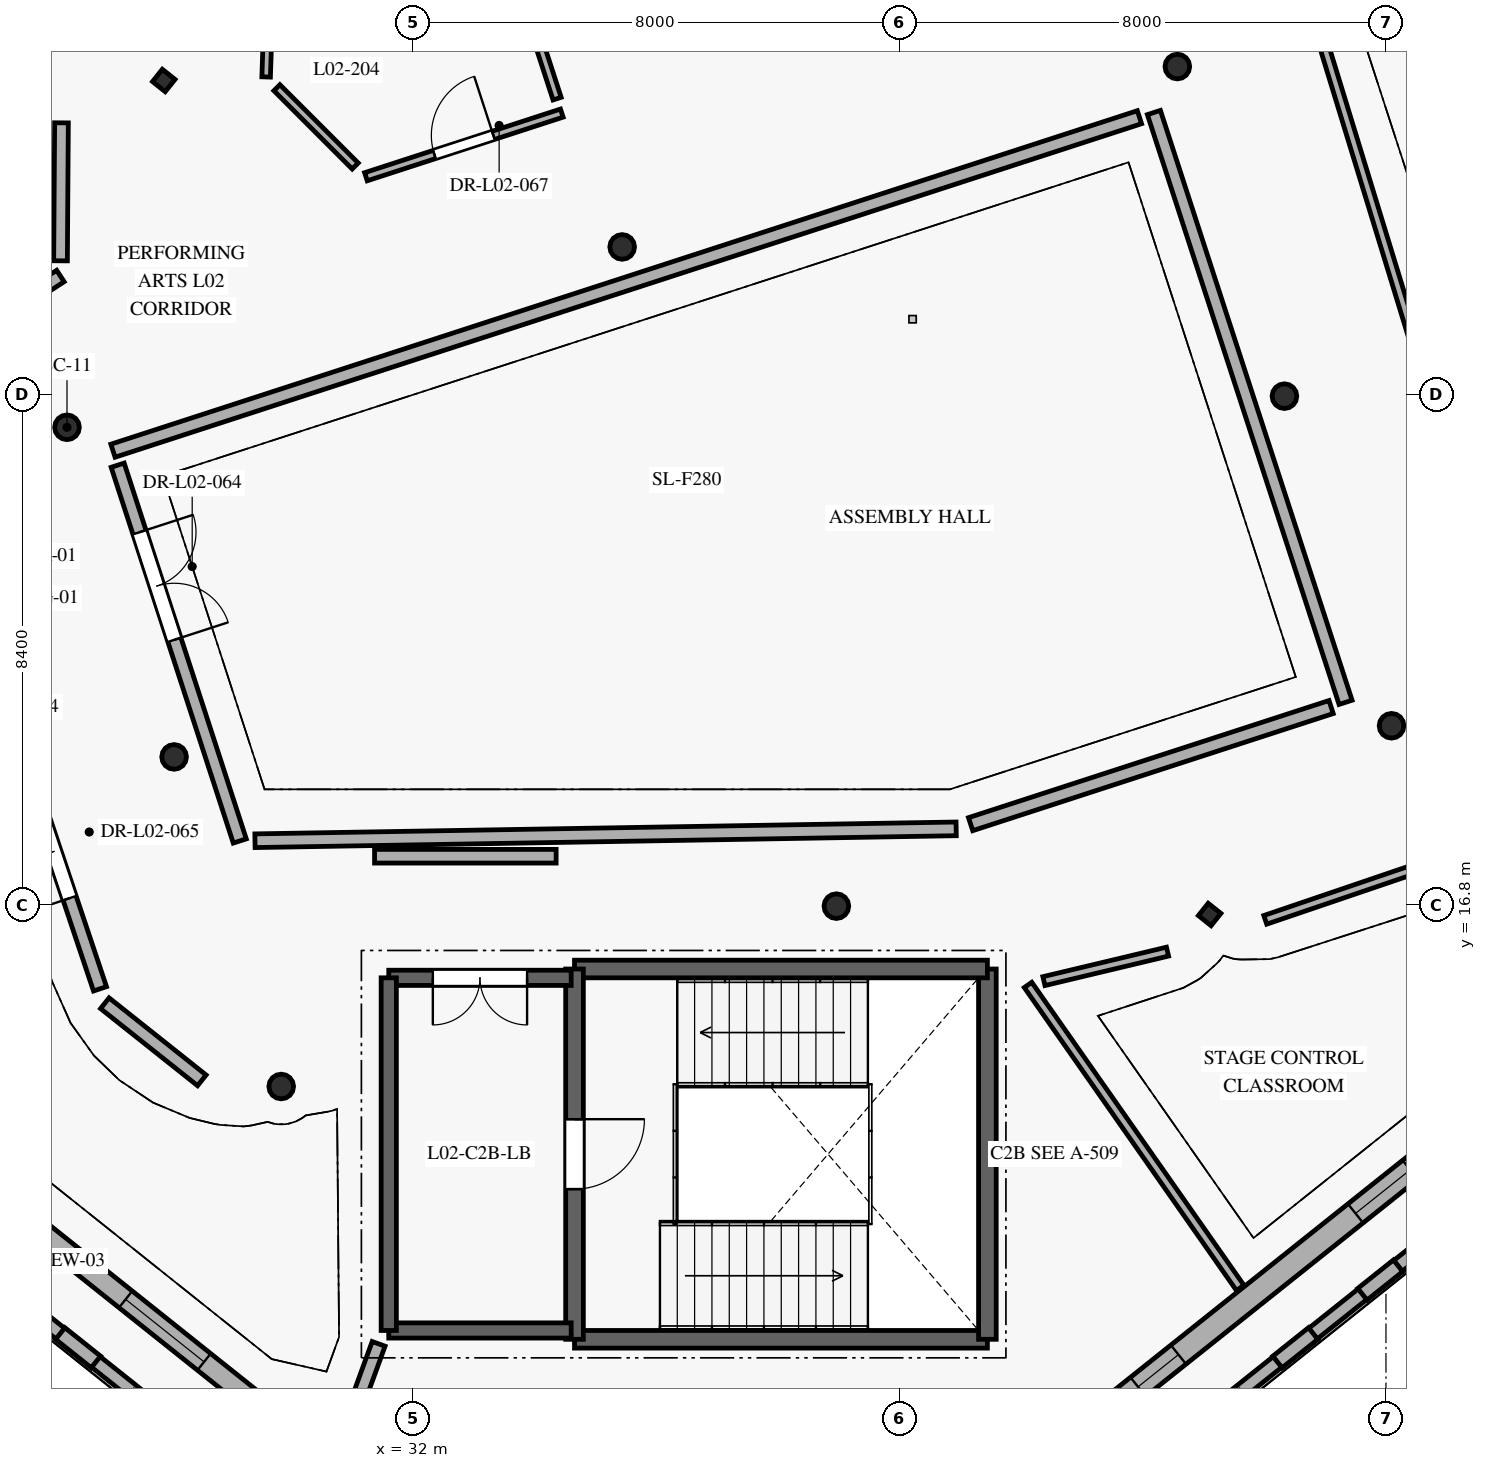
"""IFC4 building model, lengths in metres.
Left out: names, types, materials, properties, quantities, classifications, styles, units other than length and angle.
Written with IfcOpenShell. Run it as: python <this file> out.ifc"""

import sys

from ifc_helpers import new_model, si_unit, direction, frame, frame_2d, origin, origin_2d, place, context, subcontext, project, spatial, rectangle, hollow_circle, i_section, extrude, element, fill, save


model = new_model("IFC4")
c1 = context("Model", 3, precision=1e-05, world=origin(), true_north=direction((0.0, 1.0)))
c2 = subcontext(c1, "Body", "Model", "MODEL_VIEW")
j1 = project(units=[si_unit("LENGTHUNIT", "METRE"), si_unit("PLANEANGLEUNIT", "RADIAN")], contexts=[c1])
p1 = place(None, origin())
s1 = spatial("IfcSite", under=j1, at=p1, CompositionType="ELEMENT")
p2 = place(p1, origin())
s2 = spatial("IfcBuilding", under=s1, at=p2, CompositionType="ELEMENT")
p3 = place(p2, frame((0.0, 0.0, 8.4)))
s3 = spatial("IfcBuildingStorey", under=s2, at=p3, CompositionType="ELEMENT", Elevation=8.4)
for number, where, z_axis, x_axis in (
    (1, (29.831, 13.812, 0.0), (0.0, 0.0, 1.0), (0.951, 0.309, 0.0)),
    (2, (28.07, 19.233, 0.0), (0.0, 0.0, 1.0), (0.951, 0.309, 0.0)),
    (3, (26.309, 24.655, 0.0), (0.0, 0.0, 1.0), (0.951, 0.309, 0.0)),
    (4, (38.961, 16.779, 0.0), (0.0, 0.0, 1.0), (0.951, 0.309, 0.0)),
    (5, (35.439, 27.621, 0.0), (0.0, 0.0, 1.0), (0.951, 0.309, 0.0)),
    (6, (48.092, 19.746, 0.0), (0.0, 0.0, 1.0), (0.951, 0.309, 0.0)),
    (7, (46.33, 25.167, 0.0), (0.0, 0.0, 1.0), (0.951, 0.309, 0.0)),
    (8, (44.569, 30.588, 0.0), (0.0, 0.0, 1.0), (0.951, 0.309, 0.0)),
):
    element("IfcColumn", number, at=place(p3, frame(where, z_axis=z_axis, x_axis=x_axis)), inside=s3, PredefinedType="COLUMN", context=c2, shape_type="SweptSolid", body=[
        extrude(hollow_circle(Radius=0.203, WallThickness=0.016, at=origin_2d()), origin(), (0.0, 0.0, 1.0), 4.2),
    ])
for number, where, z_axis, x_axis in (
    (9, (27.9, 30.358, 0.0), (0.0, 0.0, 1.0), (-0.623, -0.782, 0.0)),
    (10, (45.1, 16.642, 0.0), (0.0, 0.0, 1.0), (0.623, 0.782, 0.0)),
):
    element("IfcColumn", number, at=place(p3, frame(where, z_axis=z_axis, x_axis=x_axis)), inside=s3, PredefinedType="COLUMN", context=c2, shape_type="SweptSolid", body=[
        extrude(i_section(OverallWidth=0.259, OverallDepth=0.267, WebThickness=0.013, FlangeThickness=0.021, FilletRadius=0.013, at=origin_2d()), origin(), (0.0, 0.0, 1.0), 4.2),
    ])
p4 = place(p3, frame((29.351, 8.655, 0.0), z_axis=(0.0, 0.0, 1.0), x_axis=(-0.781819636461, 0.623504655992, 0.0)))
e11 = element("IfcWall", 11, at=p4, inside=s3, PredefinedType="SOLIDWALL", context=c2, shape_type="SweptSolid", body=[
    extrude(rectangle(XDim=7.333, YDim=0.35, at=frame_2d((3.667, 0.0))), origin(), (0.0, 0.0, 1.0), 3.94),
])
p5 = place(p4, frame((1.008, 0.0, 0.85)))
e12 = element("IfcOpeningElement", 12, at=p5, cuts=e11, PredefinedType="OPENING", context=c2, shape_type="SweptSolid", body=[
    extrude(rectangle(XDim=1.65, YDim=1.6, at=frame_2d((0.825, 0.8))), frame((0.0, 0.185, 0.0), z_axis=(0.0, -1.0, 0.0), x_axis=(1.0, 0.0, 0.0)), (0.0, 0.0, 1.0), 0.37),
])
p6 = place(p4, frame((4.6, 0.0, 0.85)))
e13 = element("IfcOpeningElement", 13, at=p6, cuts=e11, PredefinedType="OPENING", context=c2, shape_type="SweptSolid", body=[
    extrude(rectangle(XDim=1.8, YDim=1.6, at=frame_2d((0.9, 0.8))), frame((0.0, 0.185, 0.0), z_axis=(0.0, -1.0, 0.0), x_axis=(1.0, 0.0, 0.0)), (0.0, 0.0, 1.0), 0.37),
])
p7 = place(p3, frame((49.382, 13.227, 0.0), z_axis=(0.0, 0.0, 1.0), x_axis=(-0.781819636461, -0.623504655992, 0.0)))
e14 = element("IfcWall", 14, at=p7, inside=s3, PredefinedType="SOLIDWALL", context=c2, shape_type="SweptSolid", body=[
    extrude(rectangle(XDim=7.333, YDim=0.4, at=frame_2d((3.667, 0.0))), origin(), (0.0, 0.0, 1.0), 3.94),
])
p8 = place(p7, frame((1.258, 0.0, 0.85)))
e15 = element("IfcOpeningElement", 15, at=p8, cuts=e14, PredefinedType="OPENING", context=c2, shape_type="SweptSolid", body=[
    extrude(rectangle(XDim=1.15, YDim=1.8, at=frame_2d((0.575, 0.9))), frame((0.0, 0.21, 0.0), z_axis=(0.0, -1.0, 0.0), x_axis=(1.0, 0.0, 0.0)), (0.0, 0.0, 1.0), 0.42),
])
p9 = place(p7, frame((6.133, 0.0, 0.85)))
e16 = element("IfcOpeningElement", 16, at=p9, cuts=e14, PredefinedType="OPENING", context=c2, shape_type="SweptSolid", body=[
    extrude(rectangle(XDim=0.85, YDim=1.4, at=frame_2d((0.425, 0.7))), frame((0.0, 0.21, 0.0), z_axis=(0.0, -1.0, 0.0), x_axis=(1.0, 0.0, 0.0)), (0.0, 0.0, 1.0), 0.42),
])
p10 = place(p3, frame((22.998, 12.301, 0.0), z_axis=(0.0, 0.0, 1.0), x_axis=(0.781840989125, -0.623477880702, 0.0)))
e17 = element("IfcWall", 17, at=p10, inside=s3, PredefinedType="ELEMENTEDWALL", context=c2, shape_type="SweptSolid", body=[
    extrude(rectangle(XDim=7.147, YDim=0.225, at=frame_2d((3.573, 0.0))), origin(), (0.0, 0.0, 1.0), 1.09),
])
p11 = place(p3, frame((26.198, 9.75, 1.09), z_axis=(0.0, 0.0, 1.0), x_axis=(0.781789197913, -0.623542821326, 0.0)))
e18 = element("IfcWall", 18, at=p11, inside=s3, PredefinedType="ELEMENTEDWALL", context=c2, shape_type="SweptSolid", body=[
    extrude(rectangle(XDim=0.75, YDim=0.245, at=frame_2d((0.375, 0.0))), origin(), (0.0, 0.0, 1.0), 2.85),
])
p12 = place(p3, frame((44.413, 7.844, 0.0), z_axis=(0.0, 0.0, 1.0), x_axis=(0.781830872194, 0.623490567118, 0.0)))
e19 = element("IfcWall", 19, at=p12, inside=s3, PredefinedType="ELEMENTEDWALL", context=c2, shape_type="SweptSolid", body=[
    extrude(rectangle(XDim=7.148, YDim=0.225, at=frame_2d((3.574, 0.0))), origin(), (0.0, 0.0, 1.0), 1.09),
])
for number, where, z_axis, x_axis in (
    (20, (46.216, 9.282, 1.09), (0.0, 0.0, 1.0), (0.782, 0.624, 0.0)),
    (21, (47.613, 10.396, 1.09), (0.0, 0.0, 1.0), (0.782, 0.624, 0.0)),
):
    element("IfcWall", number, at=place(p3, frame(where, z_axis=z_axis, x_axis=x_axis)), inside=s3, PredefinedType="ELEMENTEDWALL", context=c2, shape_type="SweptSolid", body=[
        extrude(rectangle(XDim=0.751, YDim=0.245, at=frame_2d((0.375, 0.0))), origin(), (0.0, 0.0, 1.0), 2.85),
    ])
p13 = place(p3, frame((34.655, 9.655, 0.0), z_axis=(0.0, 0.0, 1.0), x_axis=(1.0, 0.0, 0.0)))
e22 = element("IfcWall", 22, at=p13, inside=s3, PredefinedType="SHEAR", context=c2, shape_type="SweptSolid", body=[
    extrude(rectangle(XDim=6.79, YDim=0.29, at=frame_2d((3.395, 0.0))), origin(), (0.0, 0.0, 1.0), 3.95),
])
p14 = place(p3, frame((41.445, 9.655, 0.0), z_axis=(0.0, 0.0, 1.0), x_axis=(0.0, 1.0, 0.0)))
e23 = element("IfcWall", 23, at=p14, inside=s3, PredefinedType="SHEAR", context=c2, shape_type="SweptSolid", body=[
    extrude(rectangle(XDim=6.09, YDim=0.29, at=frame_2d((3.045, 0.0))), origin(), (0.0, 0.0, 1.0), 3.95),
])
p15 = place(p3, frame((41.445, 15.745, 0.0), z_axis=(0.0, 0.0, 1.0), x_axis=(-1.0, 0.0, 0.0)))
e24 = element("IfcWall", 24, at=p15, inside=s3, PredefinedType="SHEAR", context=c2, shape_type="SweptSolid", body=[
    extrude(rectangle(XDim=6.79, YDim=0.29, at=frame_2d((3.395, 0.0))), origin(), (0.0, 0.0, 1.0), 3.95),
])
p16 = place(p3, frame((34.655, 15.745, 0.0), z_axis=(0.0, 0.0, 1.0), x_axis=(0.0, -1.0, 0.0)))
e25 = element("IfcWall", 25, at=p16, inside=s3, PredefinedType="SHEAR", context=c2, shape_type="SweptSolid", body=[
    extrude(rectangle(XDim=6.09, YDim=0.29, at=frame_2d((3.045, 0.0))), origin(), (0.0, 0.0, 1.0), 3.95),
])
p17 = place(p16, frame((2.47, 0.0, 0.0)))
e26 = element("IfcOpeningElement", 26, at=p17, cuts=e25, PredefinedType="OPENING", context=c2, shape_type="SweptSolid", body=[
    extrude(rectangle(XDim=1.15, YDim=2.1, at=frame_2d((0.575, 1.05))), frame((0.0, 0.155, 0.0), z_axis=(0.0, -1.0, 0.0), x_axis=(1.0, 0.0, 0.0)), (0.0, 0.0, 1.0), 0.31),
])
p18 = place(p3, frame((31.6, 9.8, 0.0), z_axis=(0.0, 0.0, 1.0), x_axis=(1.0, 0.0, 0.0)))
e27 = element("IfcWall", 27, at=p18, inside=s3, PredefinedType="SHEAR", context=c2, shape_type="SweptSolid", body=[
    extrude(rectangle(XDim=3.0, YDim=0.25, at=frame_2d((1.5, 0.0))), origin(), (0.0, 0.0, 1.0), 3.95),
])
p19 = place(p3, frame((34.6, 15.6, 0.0), z_axis=(0.0, 0.0, 1.0), x_axis=(-1.0, 0.0, 0.0)))
e28 = element("IfcWall", 28, at=p19, inside=s3, PredefinedType="SHEAR", context=c2, shape_type="SweptSolid", body=[
    extrude(rectangle(XDim=3.0, YDim=0.25, at=frame_2d((1.5, 0.0))), origin(), (0.0, 0.0, 1.0), 3.95),
])
p20 = place(p19, frame((0.725, 0.0, 0.0)))
e29 = element("IfcOpeningElement", 29, at=p20, cuts=e28, PredefinedType="OPENING", context=c2, shape_type="SweptSolid", body=[
    extrude(rectangle(XDim=1.55, YDim=2.15, at=frame_2d((0.775, 1.075))), frame((0.0, 0.135, 0.0), z_axis=(0.0, -1.0, 0.0), x_axis=(1.0, 0.0, 0.0)), (0.0, 0.0, 1.0), 0.27),
])
p21 = place(p3, frame((31.6, 15.6, 0.0), z_axis=(0.0, 0.0, 1.0), x_axis=(0.0, -1.0, 0.0)))
e30 = element("IfcWall", 30, at=p21, inside=s3, PredefinedType="SHEAR", context=c2, shape_type="SweptSolid", body=[
    extrude(rectangle(XDim=5.8, YDim=0.25, at=frame_2d((2.9, 0.0))), origin(), (0.0, 0.0, 1.0), 3.95),
])
p22 = place(p3, frame((47.335, 20.131, 0.0), z_axis=(0.0, 0.0, 1.0), x_axis=(-0.309009217467, 0.951059043131, 0.0)))
e31 = element("IfcWall", 31, at=p22, inside=s3, PredefinedType="PARTITIONING", context=c2, shape_type="SweptSolid", body=[
    extrude(rectangle(XDim=10.2, YDim=0.225, at=frame_2d((5.1, 0.0))), origin(), (0.0, 0.0, 1.0), 3.95),
])
p23 = place(p3, frame((43.946, 29.754, 0.0), z_axis=(0.0, 0.0, 1.0), x_axis=(-0.951056101214, -0.309018271859, 0.0)))
e32 = element("IfcWall", 32, at=p23, inside=s3, PredefinedType="PARTITIONING", context=c2, shape_type="SweptSolid", body=[
    extrude(rectangle(XDim=17.75, YDim=0.225, at=frame_2d((8.875, 0.0))), origin(), (0.0, 0.0, 1.0), 3.95),
])
p24 = place(p3, frame((27.142, 24.031, 0.0), z_axis=(0.0, 0.0, 1.0), x_axis=(0.308983288639, -0.951067467292, 0.0)))
e33 = element("IfcWall", 33, at=p24, inside=s3, PredefinedType="PARTITIONING", context=c2, shape_type="SweptSolid", body=[
    extrude(rectangle(XDim=6.499, YDim=0.225, at=frame_2d((3.25, 0.0))), origin(), (0.0, 0.0, 1.0), 3.95),
])
p25 = place(p24, frame((1.16, 0.0, 0.0)))
e34 = element("IfcOpeningElement", 34, at=p25, cuts=e33, PredefinedType="OPENING", context=c2, shape_type="SweptSolid", body=[
    extrude(rectangle(XDim=1.86, YDim=2.2, at=frame_2d((0.93, 1.1))), frame((0.0, 0.123, 0.0), z_axis=(0.0, -1.0, 0.0), x_axis=(1.0, 0.0, 0.0)), (0.0, 0.0, 1.0), 0.245),
])
p26 = place(p3, frame((29.4, 17.855, 0.0), z_axis=(0.0, 0.0, 1.0), x_axis=(0.999856594605, 0.016934881877, 0.0)))
e35 = element("IfcWall", 35, at=p26, inside=s3, PredefinedType="PARTITIONING", context=c2, shape_type="SweptSolid", body=[
    extrude(rectangle(XDim=11.533, YDim=0.225, at=frame_2d((5.767, 0.0))), origin(), (0.0, 0.0, 1.0), 3.95),
])
p27 = place(p3, frame((41.169, 18.127, 0.0), z_axis=(0.0, 0.0, 1.0), x_axis=(0.951056803868, 0.309016109316, 0.0)))
e36 = element("IfcWall", 36, at=p27, inside=s3, PredefinedType="PARTITIONING", context=c2, shape_type="SweptSolid", body=[
    extrude(rectangle(XDim=6.234, YDim=0.225, at=frame_2d((3.117, 0.0))), origin(), (0.0, 0.0, 1.0), 3.95),
])
p28 = place(p3, frame((31.028, 8.464, 0.0), z_axis=(0.0, 0.0, 1.0), x_axis=(0.341957686727, 0.939715350778, 0.0)))
e37 = element("IfcWall", 37, at=p28, inside=s3, PredefinedType="PARTITIONING", context=c2, shape_type="SweptSolid", body=[
    extrude(rectangle(XDim=1.187, YDim=0.225, at=frame_2d((0.594, 0.0))), origin(), (0.0, 0.0, 1.0), 3.93),
])
p29 = place(p3, frame((34.353, 17.6, 0.0), z_axis=(0.0, 0.0, 1.0), x_axis=(-1.0, 0.0, 0.0)))
e38 = element("IfcWall", 38, at=p29, inside=s3, PredefinedType="PARTITIONING", context=c2, shape_type="SweptSolid", body=[
    extrude(rectangle(XDim=2.986, YDim=0.225, at=frame_2d((1.493, 0.0))), origin(), (0.0, 0.0, 1.0), 3.93),
])
p30 = place(p3, frame((28.526, 13.914, 0.0), z_axis=(0.0, 0.0, 1.0), x_axis=(-0.782746940471, 0.622340121785, 0.0)))
e39 = element("IfcWall", 39, at=p30, inside=s3, PredefinedType="PARTITIONING", context=c2, shape_type="SweptSolid", body=[
    extrude(rectangle(XDim=2.038, YDim=0.225, at=frame_2d((1.019, 0.0))), origin(), (0.0, 0.0, 1.0), 3.93),
])
p31 = place(p3, frame((26.851, 15.419, 0.0), z_axis=(0.0, 0.0, 1.0), x_axis=(-0.31777961132, 0.94816460524, 0.0)))
e40 = element("IfcWall", 40, at=p31, inside=s3, PredefinedType="PARTITIONING", context=c2, shape_type="SweptSolid", body=[
    extrude(rectangle(XDim=4.766, YDim=0.225, at=frame_2d((2.383, 0.0))), origin(), (0.0, 0.0, 1.0), 3.93),
])
p32 = place(p31, frame((1.573, 0.0, 0.0)))
e41 = element("IfcOpeningElement", 41, at=p32, cuts=e40, PredefinedType="OPENING", context=c2, shape_type="SweptSolid", body=[
    extrude(rectangle(XDim=1.62, YDim=2.18, at=frame_2d((0.81, 1.09))), frame((0.0, 0.123, 0.0), z_axis=(0.0, -1.0, 0.0), x_axis=(1.0, 0.0, 0.0)), (0.0, 0.0, 1.0), 0.245),
])
p33 = place(p3, frame((24.799, 26.233, 0.0), z_axis=(0.0, 0.0, 1.0), x_axis=(0.838780833137, 0.54446920387, 0.0)))
e42 = element("IfcWall", 42, at=p33, inside=s3, PredefinedType="PARTITIONING", context=c2, shape_type="SweptSolid", body=[
    extrude(rectangle(XDim=1.67, YDim=0.225, at=frame_2d((0.835, 0.0))), origin(), (0.0, 0.0, 1.0), 3.93),
])
p34 = place(p3, frame((26.202, 27.393, 0.0), z_axis=(0.0, 0.0, 1.0), x_axis=(0.006993588379, 0.999975544562, 0.0)))
e43 = element("IfcWall", 43, at=p34, inside=s3, PredefinedType="PARTITIONING", context=c2, shape_type="SweptSolid", body=[
    extrude(rectangle(XDim=2.269, YDim=0.225, at=frame_2d((1.135, 0.0))), origin(), (0.0, 0.0, 1.0), 3.93),
])
p35 = place(p3, frame((42.113, 15.483, 0.0), z_axis=(0.0, 0.0, 1.0), x_axis=(0.57359701491, -0.819137634642, 0.0)))
e44 = element("IfcWall", 44, at=p35, inside=s3, PredefinedType="PARTITIONING", context=c2, shape_type="SweptSolid", body=[
    extrude(rectangle(XDim=6.083, YDim=0.15, at=frame_2d((3.042, 0.0))), origin(), (0.0, 0.0, 1.0), 3.93),
])
p36 = place(p3, frame((46.981, 30.929, 0.0), z_axis=(0.0, 0.0, 1.0), x_axis=(0.292664455172, -0.956215204166, 0.0)))
e45 = element("IfcWall", 45, at=p36, inside=s3, PredefinedType="PARTITIONING", context=c2, shape_type="SweptSolid", body=[
    extrude(rectangle(XDim=11.614, YDim=0.15, at=frame_2d((5.807, 0.0))), origin(), (0.0, 0.0, 1.0), 3.93),
])
p37 = place(p36, frame((5.347, 0.0, 0.0)))
e46 = element("IfcOpeningElement", 46, at=p37, cuts=e45, PredefinedType="OPENING", context=c2, shape_type="SweptSolid", body=[
    extrude(rectangle(XDim=0.92, YDim=2.08, at=frame_2d((0.46, 1.04))), frame((0.0, 0.085, 0.0), z_axis=(0.0, -1.0, 0.0), x_axis=(1.0, 0.0, 0.0)), (0.0, 0.0, 1.0), 0.17),
])
p38 = place(p3, frame((48.682, 17.461, 0.0), z_axis=(0.0, 0.0, 1.0), x_axis=(-0.946759538407, -0.321941573014, 0.0)))
e47 = element("IfcWall", 47, at=p38, inside=s3, PredefinedType="PARTITIONING", context=c2, shape_type="SweptSolid", body=[
    extrude(rectangle(XDim=2.817, YDim=0.15, at=frame_2d((1.409, 0.0))), origin(), (0.0, 0.0, 1.0), 3.93),
])
p39 = place(p3, frame((44.407, 16.031, 0.0), z_axis=(0.0, 0.0, 1.0), x_axis=(-0.972671897965, -0.232183933356, 0.0)))
e48 = element("IfcWall", 48, at=p39, inside=s3, PredefinedType="PARTITIONING", context=c2, shape_type="SweptSolid", body=[
    extrude(rectangle(XDim=2.089, YDim=0.15, at=frame_2d((1.045, 0.0))), origin(), (0.0, 0.0, 1.0), 3.93),
])
p40 = place(p3, frame((31.225, 28.775, 0.0), z_axis=(0.0, 0.0, 1.0), x_axis=(0.951056314451, 0.309017615587, 0.0)))
e49 = element("IfcWall", 49, at=p40, inside=s3, PredefinedType="PLUMBINGWALL", context=c2, shape_type="SweptSolid", body=[
    extrude(rectangle(XDim=3.387, YDim=0.14, at=frame_2d((1.693, 0.0))), origin(), (0.0, 0.0, 1.0), 3.93),
])
p41 = place(p40, frame((1.184, 0.0, 0.0)))
e50 = element("IfcOpeningElement", 50, at=p41, cuts=e49, PredefinedType="OPENING", context=c2, shape_type="SweptSolid", body=[
    extrude(rectangle(XDim=1.02, YDim=2.06, at=frame_2d((0.51, 1.03))), frame((0.0, 0.08, 0.0), z_axis=(0.0, -1.0, 0.0), x_axis=(1.0, 0.0, 0.0)), (0.0, 0.0, 1.0), 0.16),
])
p42 = place(p3, frame((34.369, 30.06, 0.0), z_axis=(0.0, 0.0, 1.0), x_axis=(-0.30909782547, 0.951030248883, 0.0)))
e51 = element("IfcWall", 51, at=p42, inside=s3, PredefinedType="PLUMBINGWALL", context=c2, shape_type="SweptSolid", body=[
    extrude(rectangle(XDim=1.409, YDim=0.14, at=frame_2d((0.705, 0.0))), origin(), (0.0, 0.0, 1.0), 3.93),
])
p43 = place(p3, frame((29.794, 36.841, 0.0), z_axis=(0.0, 0.0, 1.0), x_axis=(-0.032816547949, -0.999461392041, 0.0)))
e52 = element("IfcWall", 52, at=p43, inside=s3, PredefinedType="PLUMBINGWALL", context=c2, shape_type="SweptSolid", body=[
    extrude(rectangle(XDim=6.428, YDim=0.14, at=frame_2d((3.214, 0.0))), origin(), (0.0, 0.0, 1.0), 3.93),
])
p44 = place(p3, frame((29.76, 30.24, 0.0), z_axis=(0.0, 0.0, 1.0), x_axis=(0.707106781187, -0.707106781187, 0.0)))
e53 = element("IfcWall", 53, at=p44, inside=s3, PredefinedType="PLUMBINGWALL", context=c2, shape_type="SweptSolid", body=[
    extrude(rectangle(XDim=1.821, YDim=0.14, at=frame_2d((0.911, 0.0))), origin(), (0.0, 0.0, 1.0), 3.93),
])
p45 = place(p5, origin())
e54 = element("IfcWindow", 54, at=p45, inside=s3, PartitioningType="SINGLE_PANEL", PredefinedType="WINDOW", context=c2, shape_type="SweptSolid", body=[
    extrude(rectangle(XDim=1.65, YDim=1.6, at=frame_2d((0.825, 0.8))), frame((0.0, 0.03, 0.0), z_axis=(0.0, -1.0, 0.0), x_axis=(1.0, 0.0, 0.0)), (0.0, 0.0, 1.0), 0.06),
])
fill(e12, e54)
p46 = place(p8, origin())
e55 = element("IfcWindow", 55, at=p46, inside=s3, PartitioningType="SINGLE_PANEL", PredefinedType="WINDOW", context=c2, shape_type="SweptSolid", body=[
    extrude(rectangle(XDim=1.15, YDim=1.8, at=frame_2d((0.575, 0.9))), frame((0.0, 0.03, 0.0), z_axis=(0.0, -1.0, 0.0), x_axis=(1.0, 0.0, 0.0)), (0.0, 0.0, 1.0), 0.06),
])
fill(e15, e55)
p47 = place(p9, origin())
e56 = element("IfcWindow", 56, at=p47, inside=s3, PartitioningType="SINGLE_PANEL", PredefinedType="WINDOW", context=c2, shape_type="SweptSolid", body=[
    extrude(rectangle(XDim=0.85, YDim=1.4, at=frame_2d((0.425, 0.7))), frame((0.0, 0.03, 0.0), z_axis=(0.0, -1.0, 0.0), x_axis=(1.0, 0.0, 0.0)), (0.0, 0.0, 1.0), 0.06),
])
fill(e16, e56)
p48 = place(p17, origin())
e57 = element("IfcDoor", 57, at=p48, inside=s3, OperationType="SINGLE_SWING_LEFT", PredefinedType="DOOR", context=c2, shape_type="SweptSolid", body=[
    extrude(rectangle(XDim=1.15, YDim=2.1, at=frame_2d((0.575, 1.05))), frame((0.0, 0.025, 0.0), z_axis=(0.0, -1.0, 0.0), x_axis=(1.0, 0.0, 0.0)), (0.0, 0.0, 1.0), 0.05),
])
fill(e26, e57)
p49 = place(p20, origin())
e58 = element("IfcDoor", 58, at=p49, inside=s3, OperationType="DOUBLE_DOOR_SINGLE_SWING", PredefinedType="DOOR", context=c2, shape_type="SweptSolid", body=[
    extrude(rectangle(XDim=1.55, YDim=2.15, at=frame_2d((0.775, 1.075))), frame((0.0, 0.025, 0.0), z_axis=(0.0, -1.0, 0.0), x_axis=(1.0, 0.0, 0.0)), (0.0, 0.0, 1.0), 0.05),
])
fill(e29, e58)
p50 = place(p25, frame((1.86, 0.0, 0.0), z_axis=(0.0, 0.0, 1.0), x_axis=(-1.0, 0.0, 0.0)))
e59 = element("IfcDoor", 59, at=p50, inside=s3, OperationType="DOUBLE_DOOR_SINGLE_SWING", PredefinedType="DOOR", context=c2, shape_type="SweptSolid", body=[
    extrude(rectangle(XDim=1.86, YDim=2.2, at=frame_2d((0.93, 1.1))), frame((0.0, 0.025, 0.0), z_axis=(0.0, -1.0, 0.0), x_axis=(1.0, 0.0, 0.0)), (0.0, 0.0, 1.0), 0.05),
])
fill(e34, e59)
p51 = place(p32, origin())
e60 = element("IfcDoor", 60, at=p51, inside=s3, OperationType="DOUBLE_DOOR_SINGLE_SWING", PredefinedType="DOOR", context=c2, shape_type="SweptSolid", body=[
    extrude(rectangle(XDim=1.62, YDim=2.18, at=frame_2d((0.81, 1.09))), frame((0.0, 0.025, 0.0), z_axis=(0.0, -1.0, 0.0), x_axis=(1.0, 0.0, 0.0)), (0.0, 0.0, 1.0), 0.05),
])
fill(e41, e60)
p52 = place(p41, frame((1.02, 0.0, 0.0), z_axis=(0.0, 0.0, 1.0), x_axis=(-1.0, 0.0, 0.0)))
e61 = element("IfcDoor", 61, at=p52, inside=s3, OperationType="SINGLE_SWING_RIGHT", PredefinedType="DOOR", context=c2, shape_type="SweptSolid", body=[
    extrude(rectangle(XDim=1.02, YDim=2.06, at=frame_2d((0.51, 1.03))), frame((0.0, 0.025, 0.0), z_axis=(0.0, -1.0, 0.0), x_axis=(1.0, 0.0, 0.0)), (0.0, 0.0, 1.0), 0.05),
])
fill(e50, e61)
save(model, sys.argv[1])
